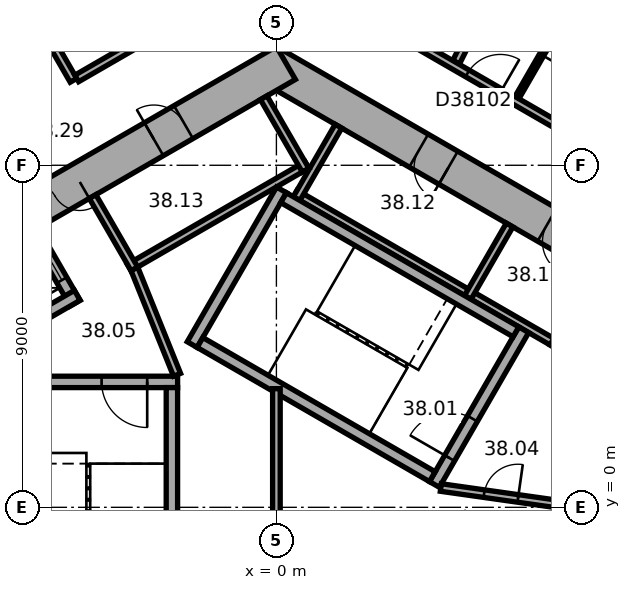
"""IFC4 building model, lengths in metres.
Left out: names, types, materials, properties, quantities, classifications, styles, units other than length and angle.
Written with IfcOpenShell. Run it as: python <this file> out.ifc"""

import sys

from ifc_helpers import new_model, si_unit, direction, frame, frame_2d, origin, place, context, subcontext, project, spatial, rectangle, extrude, element, fill, save


model = new_model("IFC4")
c1 = context("Model", 3, precision=1e-05, world=origin(), true_north=direction((0.0, 1.0)))
c2 = subcontext(c1, "Body", "Model", "MODEL_VIEW")
j1 = project(units=[si_unit("LENGTHUNIT", "METRE"), si_unit("PLANEANGLEUNIT", "RADIAN")], contexts=[c1])
p1 = place(None, origin())
s1 = spatial("IfcSite", under=j1, at=p1, CompositionType="ELEMENT")
p2 = place(p1, origin())
s2 = spatial("IfcBuilding", under=s1, at=p2, CompositionType="ELEMENT")
p3 = place(p2, frame((0.0, 0.0, 157.7)))
s3 = spatial("IfcBuildingStorey", under=s2, at=p3, CompositionType="ELEMENT", Elevation=157.7)
p4 = place(p3, frame((10.25, 5.629, 0.0), z_axis=(0.0, 0.0, 1.0), x_axis=(-0.866022616891, 0.50000482701, 0.0)))
e1 = element("IfcWall", 1, at=p4, inside=s3, PredefinedType="SHEAR", context=c2, shape_type="SweptSolid", body=[
    extrude(rectangle(XDim=12.125, YDim=1.0, at=frame_2d((6.062, 0.0))), origin(), (0.0, 0.0, 1.0), 3.7),
])
p5 = place(p4, frame((2.712, 0.0, 0.0)))
e2 = element("IfcOpeningElement", 2, at=p5, cuts=e1, PredefinedType="OPENING", context=c2, shape_type="SweptSolid", body=[
    extrude(rectangle(XDim=0.9, YDim=2.1, at=frame_2d((0.45, 1.05))), frame((0.0, 0.51, 0.0), z_axis=(0.0, -1.0, 0.0), x_axis=(1.0, 0.0, 0.0)), (0.0, 0.0, 1.0), 1.02),
])
p6 = place(p4, frame((6.612, 0.0, 0.0)))
e3 = element("IfcOpeningElement", 3, at=p6, cuts=e1, PredefinedType="OPENING", context=c2, shape_type="SweptSolid", body=[
    extrude(rectangle(XDim=0.9, YDim=2.1, at=frame_2d((0.45, 1.05))), frame((0.0, 0.51, 0.0), z_axis=(0.0, -1.0, 0.0), x_axis=(1.0, 0.0, 0.0)), (0.0, 0.0, 1.0), 1.02),
])
p7 = place(p3, frame((0.25, 11.691, 0.0), z_axis=(0.0, 0.0, 1.0), x_axis=(-0.866022616891, -0.50000482701, 0.0)))
e4 = element("IfcWall", 4, at=p7, inside=s3, PredefinedType="SHEAR", context=c2, shape_type="SweptSolid", body=[
    extrude(rectangle(XDim=12.125, YDim=1.0, at=frame_2d((6.062, 0.0))), origin(), (0.0, 0.0, 1.0), 3.7),
])
p8 = place(p7, frame((6.262, 0.0, 0.0)))
e5 = element("IfcOpeningElement", 5, at=p8, cuts=e4, PredefinedType="OPENING", context=c2, shape_type="SweptSolid", body=[
    extrude(rectangle(XDim=1.5, YDim=2.1, at=frame_2d((0.75, 1.05))), frame((0.0, 0.51, 0.0), z_axis=(0.0, -1.0, 0.0), x_axis=(1.0, 0.0, 0.0)), (0.0, 0.0, 1.0), 1.02),
])
p9 = place(p7, frame((3.112, 0.0, 0.0)))
e6 = element("IfcOpeningElement", 6, at=p9, cuts=e4, PredefinedType="OPENING", context=c2, shape_type="SweptSolid", body=[
    extrude(rectangle(XDim=0.9, YDim=2.1, at=frame_2d((0.45, 1.05))), frame((0.0, 0.51, 0.0), z_axis=(0.0, -1.0, 0.0), x_axis=(1.0, 0.0, 0.0)), (0.0, 0.0, 1.0), 1.02),
])
p10 = place(p3, frame((7.424, 4.259, 0.0), z_axis=(0.0, 0.0, 1.0), x_axis=(-0.866026010844, 0.49999894854, 0.0)))
e7 = element("IfcWall", 7, at=p10, inside=s3, PredefinedType="PARTITIONING", context=c2, shape_type="SweptSolid", body=[
    extrude(rectangle(XDim=8.0, YDim=0.2, at=frame_2d((4.0, 0.0))), origin(), (0.0, 0.0, 1.0), 3.42),
])
for number, where, z_axis, x_axis in (
    (8, (7.287, 4.222, 0.0), (0.0, 0.0, 1.0), (0.5, 0.866, 0.0)),
    (9, (5.036, 5.522, 0.0), (0.0, 0.0, 1.0), (0.5, 0.866, 0.0)),
    (10, (0.532, 8.122, 0.0), (0.0, 0.0, 1.0), (0.5, 0.866, 0.0)),
):
    element("IfcWall", number, at=place(p3, frame(where, z_axis=z_axis, x_axis=x_axis)), inside=s3, PredefinedType="PARTITIONING", context=c2, shape_type="SweptSolid", body=[
        extrude(rectangle(XDim=2.2, YDim=0.2, at=frame_2d((1.1, 0.0))), origin(), (0.0, 0.0, 1.0), 3.42),
    ])
p11 = place(p3, frame((0.803, 9.009, 0.0), z_axis=(0.0, 0.0, 1.0), x_axis=(-0.866028230842, -0.499995103361, 0.0)))
e11 = element("IfcWall", 11, at=p11, inside=s3, PredefinedType="PARTITIONING", context=c2, shape_type="SweptSolid", body=[
    extrude(rectangle(XDim=5.4, YDim=0.2, at=frame_2d((2.7, 0.0))), origin(), (0.0, 0.0, 1.0), 3.42),
])
p12 = place(p3, frame((0.767, 8.872, 0.0), z_axis=(0.0, 0.0, 1.0), x_axis=(-0.499994660107, 0.866028486751, 0.0)))
e12 = element("IfcWall", 12, at=p12, inside=s3, PredefinedType="PARTITIONING", context=c2, shape_type="SweptSolid", body=[
    extrude(rectangle(XDim=2.2, YDim=0.2, at=frame_2d((1.1, 0.0))), origin(), (0.0, 0.0, 1.0), 3.42),
])
p13 = place(p3, frame((-3.737, 6.272, 0.0), z_axis=(0.0, 0.0, 1.0), x_axis=(-0.50002983664, 0.866008176907, 0.0)))
e13 = element("IfcWall", 13, at=p13, inside=s3, PredefinedType="PARTITIONING", context=c2, shape_type="SweptSolid", body=[
    extrude(rectangle(XDim=2.2, YDim=0.2, at=frame_2d((1.1, 0.0))), origin(), (0.0, 0.0, 1.0), 3.42),
])
p14 = place(p3, frame((4.158, 0.602, 0.0), z_axis=(0.0, 0.0, 1.0), x_axis=(0.499977259774, 0.866038532462, 0.0)))
e14 = element("IfcWall", 14, at=p14, inside=s3, PredefinedType="SHEAR", context=c2, shape_type="SweptSolid", body=[
    extrude(rectangle(XDim=4.7, YDim=0.3, at=frame_2d((2.35, 0.0))), origin(), (0.0, 0.0, 1.0), 3.42),
])
p15 = place(p14, frame((0.8, 0.0, 0.0)))
e15 = element("IfcOpeningElement", 15, at=p15, cuts=e14, PredefinedType="OPENING", context=c2, shape_type="SweptSolid", body=[
    extrude(rectangle(XDim=1.2, YDim=2.1, at=frame_2d((0.6, 1.05))), frame((0.0, 0.16, 0.0), z_axis=(0.0, -1.0, 0.0), x_axis=(1.0, 0.0, 0.0)), (0.0, 0.0, 1.0), 0.32),
])
p16 = place(p3, frame((-2.216, 4.282, 0.0), z_axis=(0.0, 0.0, 1.0), x_axis=(0.499977259774, 0.866038532462, 0.0)))
e16 = element("IfcWall", 16, at=p16, inside=s3, PredefinedType="SHEAR", context=c2, shape_type="SweptSolid", body=[
    extrude(rectangle(XDim=4.7, YDim=0.3, at=frame_2d((2.35, 0.0))), origin(), (0.0, 0.0, 1.0), 3.42),
])
for number, where, z_axis, x_axis in (
    (17, (4.103, 0.807, 0.0), (0.0, 0.0, 1.0), (-0.866, 0.5, 0.0)),
    (18, (6.303, 4.617, 0.0), (0.0, 0.0, 1.0), (-0.866, 0.5, 0.0)),
):
    element("IfcWall", number, at=place(p3, frame(where, z_axis=z_axis, x_axis=x_axis)), inside=s3, PredefinedType="SHEAR", context=c2, shape_type="SweptSolid", body=[
        extrude(rectangle(XDim=7.06, YDim=0.3, at=frame_2d((3.53, 0.0))), origin(), (0.0, 0.0, 1.0), 3.42),
    ])
p17 = place(p3, frame((-2.6, 3.3, 0.0), z_axis=(0.0, 0.0, 1.0), x_axis=(-1.0, 0.0, 0.0)))
e19 = element("IfcWall", 19, at=p17, inside=s3, PredefinedType="SHEAR", context=c2, shape_type="SweptSolid", body=[
    extrude(rectangle(XDim=4.7, YDim=0.3, at=frame_2d((2.35, 0.0))), origin(), (0.0, 0.0, 1.0), 3.42),
])
p18 = place(p17, frame((0.8, 0.0, 0.0)))
e20 = element("IfcOpeningElement", 20, at=p18, cuts=e19, PredefinedType="OPENING", context=c2, shape_type="SweptSolid", body=[
    extrude(rectangle(XDim=1.2, YDim=2.1, at=frame_2d((0.6, 1.05))), frame((0.0, 0.16, 0.0), z_axis=(0.0, -1.0, 0.0), x_axis=(1.0, 0.0, 0.0)), (0.0, 0.0, 1.0), 0.32),
])
p19 = place(p3, frame((-2.75, 3.15, 0.0), z_axis=(0.0, 0.0, 1.0), x_axis=(0.0, -1.0, 0.0)))
e21 = element("IfcWall", 21, at=p19, inside=s3, PredefinedType="SHEAR", context=c2, shape_type="SweptSolid", body=[
    extrude(rectangle(XDim=7.06, YDim=0.3, at=frame_2d((3.53, 0.0))), origin(), (0.0, 0.0, 1.0), 3.42),
])
p20 = place(p3, frame((4.327, 0.521, 0.0), z_axis=(0.0, 0.0, 1.0), x_axis=(0.990124376366, -0.14019172346, 0.0)))
e22 = element("IfcWall", 22, at=p20, inside=s3, PredefinedType="PARTITIONING", context=c2, shape_type="SweptSolid", body=[
    extrude(rectangle(XDim=3.002, YDim=0.2, at=frame_2d((1.501, 0.0))), origin(), (0.0, 0.0, 1.0), 3.42),
])
p21 = place(p20, frame((1.15, 0.0, 0.0)))
e23 = element("IfcOpeningElement", 23, at=p21, cuts=e22, PredefinedType="OPENING", context=c2, shape_type="SweptSolid", body=[
    extrude(rectangle(XDim=0.9, YDim=2.1, at=frame_2d((0.45, 1.05))), frame((0.0, 0.11, 0.0), z_axis=(0.0, -1.0, 0.0), x_axis=(1.0, 0.0, 0.0)), (0.0, 0.0, 1.0), 0.22),
])
p22 = place(p3, frame((-5.295, 5.372, 0.0), z_axis=(0.0, 0.0, 1.0), x_axis=(-0.500077893725, 0.86598042715, 0.0)))
e24 = element("IfcWall", 24, at=p22, inside=s3, PredefinedType="SHEAR", context=c2, shape_type="SweptSolid", body=[
    extrude(rectangle(XDim=2.2, YDim=0.3, at=frame_2d((1.1, 0.0))), origin(), (0.0, 0.0, 1.0), 3.42),
])
p23 = place(p22, frame((0.7, 0.0, 0.0)))
e25 = element("IfcOpeningElement", 25, at=p23, cuts=e24, PredefinedType="OPENING", context=c2, shape_type="SweptSolid", body=[
    extrude(rectangle(XDim=1.1, YDim=2.1, at=frame_2d((0.55, 1.05))), frame((0.0, 0.16, 0.0), z_axis=(0.0, -1.0, 0.0), x_axis=(1.0, 0.0, 0.0)), (0.0, 0.0, 1.0), 0.32),
])
p24 = place(p3, frame((-5.24, 5.577, 0.0), z_axis=(0.0, 0.0, 1.0), x_axis=(-0.866014461049, -0.500018952895, 0.0)))
e26 = element("IfcWall", 26, at=p24, inside=s3, PredefinedType="SHEAR", context=c2, shape_type="SweptSolid", body=[
    extrude(rectangle(XDim=3.35, YDim=0.3, at=frame_2d((1.675, 0.0))), origin(), (0.0, 0.0, 1.0), 3.42),
])
p25 = place(p3, frame((-2.615, 3.487, 0.0), z_axis=(0.0, 0.0, 1.0), x_axis=(-0.373576831041, 0.92759924068, 0.0)))
e27 = element("IfcWall", 27, at=p25, inside=s3, PredefinedType="PARTITIONING", context=c2, shape_type="SweptSolid", body=[
    extrude(rectangle(XDim=3.002, YDim=0.2, at=frame_2d((1.501, 0.0))), origin(), (0.0, 0.0, 1.0), 3.42),
])
p26 = place(p3, frame((0.0, -3.122, 0.0), z_axis=(0.0, 0.0, 1.0), x_axis=(0.0, 1.0, 0.0)))
e28 = element("IfcWall", 28, at=p26, inside=s3, PredefinedType="PARTITIONING", context=c2, shape_type="SweptSolid", body=[
    extrude(rectangle(XDim=6.245, YDim=0.2, at=frame_2d((3.122, 0.0))), origin(), (0.0, 0.0, 1.0), 3.42),
])
p27 = place(p3, frame((-9.515, 18.466, 0.0), z_axis=(0.0, 0.0, 1.0), x_axis=(0.500010139422, -0.866019549707, 0.0)))
e29 = element("IfcWall", 29, at=p27, inside=s3, PredefinedType="PARTITIONING", context=c2, shape_type="SweptSolid", body=[
    extrude(rectangle(XDim=8.35, YDim=0.2, at=frame_2d((4.175, 0.0))), origin(), (0.0, 0.0, 1.0), 2.87),
])
p28 = place(p27, frame((3.675, 0.0, 0.0)))
e30 = element("IfcOpeningElement", 30, at=p28, cuts=e29, PredefinedType="OPENING", context=c2, shape_type="SweptSolid", body=[
    extrude(rectangle(XDim=1.0, YDim=2.1, at=frame_2d((0.5, 1.05))), frame((0.0, 0.11, 0.0), z_axis=(0.0, -1.0, 0.0), x_axis=(1.0, 0.0, 0.0)), (0.0, 0.0, 1.0), 0.22),
])
p29 = place(p3, frame((-0.95, 13.77, 0.0), z_axis=(0.0, 0.0, 1.0), x_axis=(-0.866036689987, -0.499980451214, 0.0)))
e31 = element("IfcWall", 31, at=p29, inside=s3, PredefinedType="PARTITIONING", context=c2, shape_type="SweptSolid", body=[
    extrude(rectangle(XDim=4.969, YDim=0.2, at=frame_2d((2.485, 0.0))), origin(), (0.0, 0.0, 1.0), 3.42),
])
p30 = place(p3, frame((6.33, 10.779, 0.0), z_axis=(0.0, 0.0, 1.0), x_axis=(0.500010275428, 0.866019471182, 0.0)))
e32 = element("IfcWall", 32, at=p30, inside=s3, PredefinedType="PARTITIONING", context=c2, shape_type="SweptSolid", body=[
    extrude(rectangle(XDim=3.5, YDim=0.12, at=frame_2d((1.75, 0.0))), origin(), (0.0, 0.0, 1.0), 3.42),
])
p31 = place(p30, frame((1.3, 0.0, 0.0)))
e33 = element("IfcOpeningElement", 33, at=p31, cuts=e32, PredefinedType="OPENING", context=c2, shape_type="SweptSolid", body=[
    extrude(rectangle(XDim=0.9, YDim=2.1, at=frame_2d((0.45, 1.05))), frame((0.0, 0.07, 0.0), z_axis=(0.0, -1.0, 0.0), x_axis=(1.0, 0.0, 0.0)), (0.0, 0.0, 1.0), 0.14),
])
p32 = place(p3, frame((8.37, 19.013, 0.0), z_axis=(0.0, 0.0, 1.0), x_axis=(-0.446183598632, -0.894941448538, 0.0)))
e34 = element("IfcWall", 34, at=p32, inside=s3, PredefinedType="PARTITIONING", context=c2, shape_type="SweptSolid", body=[
    extrude(rectangle(XDim=8.156, YDim=0.2, at=frame_2d((4.078, 0.0))), origin(), (0.0, 0.0, 1.0), 3.42),
])
p33 = place(p3, frame((9.224, 8.993, 0.0), z_axis=(0.0, 0.0, 1.0), x_axis=(-0.866031754707, 0.499988999718, 0.0)))
e35 = element("IfcWall", 35, at=p33, inside=s3, PredefinedType="PARTITIONING", context=c2, shape_type="SweptSolid", body=[
    extrude(rectangle(XDim=9.514, YDim=0.2, at=frame_2d((4.757, 0.0))), origin(), (0.0, 0.0, 1.0), 3.42),
])
p34 = place(p33, frame((3.848, 0.0, 0.0)))
e36 = element("IfcOpeningElement", 36, at=p34, cuts=e35, PredefinedType="OPENING", context=c2, shape_type="SweptSolid", body=[
    extrude(rectangle(XDim=1.0, YDim=2.1, at=frame_2d((0.5, 1.05))), frame((0.0, 0.11, 0.0), z_axis=(0.0, -1.0, 0.0), x_axis=(1.0, 0.0, 0.0)), (0.0, 0.0, 1.0), 0.22),
])
p35 = place(p8, origin())
e37 = element("IfcDoor", 37, at=p35, inside=s3, OperationType="DOUBLE_DOOR_SINGLE_SWING", PredefinedType="DOOR", context=c2, shape_type="SweptSolid", body=[
    extrude(rectangle(XDim=1.5, YDim=2.1, at=frame_2d((0.75, 1.05))), frame((0.0, 0.025, 0.0), z_axis=(0.0, -1.0, 0.0), x_axis=(1.0, 0.0, 0.0)), (0.0, 0.0, 1.0), 0.05),
])
fill(e5, e37)
p36 = place(p15, origin())
e38 = element("IfcDoor", 38, at=p36, inside=s3, OperationType="SINGLE_SWING_RIGHT", PredefinedType="DOOR", context=c2, shape_type="SweptSolid", body=[
    extrude(rectangle(XDim=1.2, YDim=2.1, at=frame_2d((0.6, 1.05))), frame((0.0, 0.025, 0.0), z_axis=(0.0, -1.0, 0.0), x_axis=(1.0, 0.0, 0.0)), (0.0, 0.0, 1.0), 0.05),
])
fill(e15, e38)
p37 = place(p18, origin())
e39 = element("IfcDoor", 39, at=p37, inside=s3, OperationType="SINGLE_SWING_RIGHT", PredefinedType="DOOR", context=c2, shape_type="SweptSolid", body=[
    extrude(rectangle(XDim=1.2, YDim=2.1, at=frame_2d((0.6, 1.05))), frame((0.0, 0.025, 0.0), z_axis=(0.0, -1.0, 0.0), x_axis=(1.0, 0.0, 0.0)), (0.0, 0.0, 1.0), 0.05),
])
fill(e20, e39)
p38 = place(p21, origin())
e40 = element("IfcDoor", 40, at=p38, inside=s3, OperationType="SINGLE_SWING_LEFT", PredefinedType="DOOR", context=c2, shape_type="SweptSolid", body=[
    extrude(rectangle(XDim=0.9, YDim=2.1, at=frame_2d((0.45, 1.05))), frame((0.0, 0.025, 0.0), z_axis=(0.0, -1.0, 0.0), x_axis=(1.0, 0.0, 0.0)), (0.0, 0.0, 1.0), 0.05),
])
fill(e23, e40)
p39 = place(p5, origin())
e41 = element("IfcDoor", 41, at=p39, inside=s3, OperationType="SINGLE_SWING_LEFT", PredefinedType="DOOR", context=c2, shape_type="SweptSolid", body=[
    extrude(rectangle(XDim=0.9, YDim=2.1, at=frame_2d((0.45, 1.05))), frame((0.0, 0.025, 0.0), z_axis=(0.0, -1.0, 0.0), x_axis=(1.0, 0.0, 0.0)), (0.0, 0.0, 1.0), 0.05),
])
fill(e2, e41)
p40 = place(p6, origin())
e42 = element("IfcDoor", 42, at=p40, inside=s3, OperationType="SINGLE_SWING_LEFT", PredefinedType="DOOR", context=c2, shape_type="SweptSolid", body=[
    extrude(rectangle(XDim=0.9, YDim=2.1, at=frame_2d((0.45, 1.05))), frame((0.0, 0.025, 0.0), z_axis=(0.0, -1.0, 0.0), x_axis=(1.0, 0.0, 0.0)), (0.0, 0.0, 1.0), 0.05),
])
fill(e3, e42)
p41 = place(p9, origin())
e43 = element("IfcDoor", 43, at=p41, inside=s3, OperationType="SINGLE_SWING_LEFT", PredefinedType="DOOR", context=c2, shape_type="SweptSolid", body=[
    extrude(rectangle(XDim=0.9, YDim=2.1, at=frame_2d((0.45, 1.05))), frame((0.0, 0.025, 0.0), z_axis=(0.0, -1.0, 0.0), x_axis=(1.0, 0.0, 0.0)), (0.0, 0.0, 1.0), 0.05),
])
fill(e6, e43)
p42 = place(p23, origin())
e44 = element("IfcDoor", 44, at=p42, inside=s3, OperationType="DOUBLE_DOOR_SLIDING", PredefinedType="DOOR", context=c2, shape_type="SweptSolid", body=[
    extrude(rectangle(XDim=1.1, YDim=2.1, at=frame_2d((0.55, 1.05))), frame((0.0, 0.025, 0.0), z_axis=(0.0, -1.0, 0.0), x_axis=(1.0, 0.0, 0.0)), (0.0, 0.0, 1.0), 0.05),
])
fill(e25, e44)
p43 = place(p34, origin())
e45 = element("IfcDoor", 45, at=p43, inside=s3, OperationType="SINGLE_SWING_LEFT", PredefinedType="DOOR", context=c2, shape_type="SweptSolid", body=[
    extrude(rectangle(XDim=1.0, YDim=2.1, at=frame_2d((0.5, 1.05))), frame((0.0, 0.025, 0.0), z_axis=(0.0, -1.0, 0.0), x_axis=(1.0, 0.0, 0.0)), (0.0, 0.0, 1.0), 0.05),
])
fill(e36, e45)
p44 = place(p31, origin())
e46 = element("IfcDoor", 46, at=p44, inside=s3, OperationType="SINGLE_SWING_LEFT", PredefinedType="DOOR", context=c2, shape_type="SweptSolid", body=[
    extrude(rectangle(XDim=0.9, YDim=2.1, at=frame_2d((0.45, 1.05))), frame((0.0, 0.025, 0.0), z_axis=(0.0, -1.0, 0.0), x_axis=(1.0, 0.0, 0.0)), (0.0, 0.0, 1.0), 0.05),
])
fill(e33, e46)
save(model, sys.argv[1])
